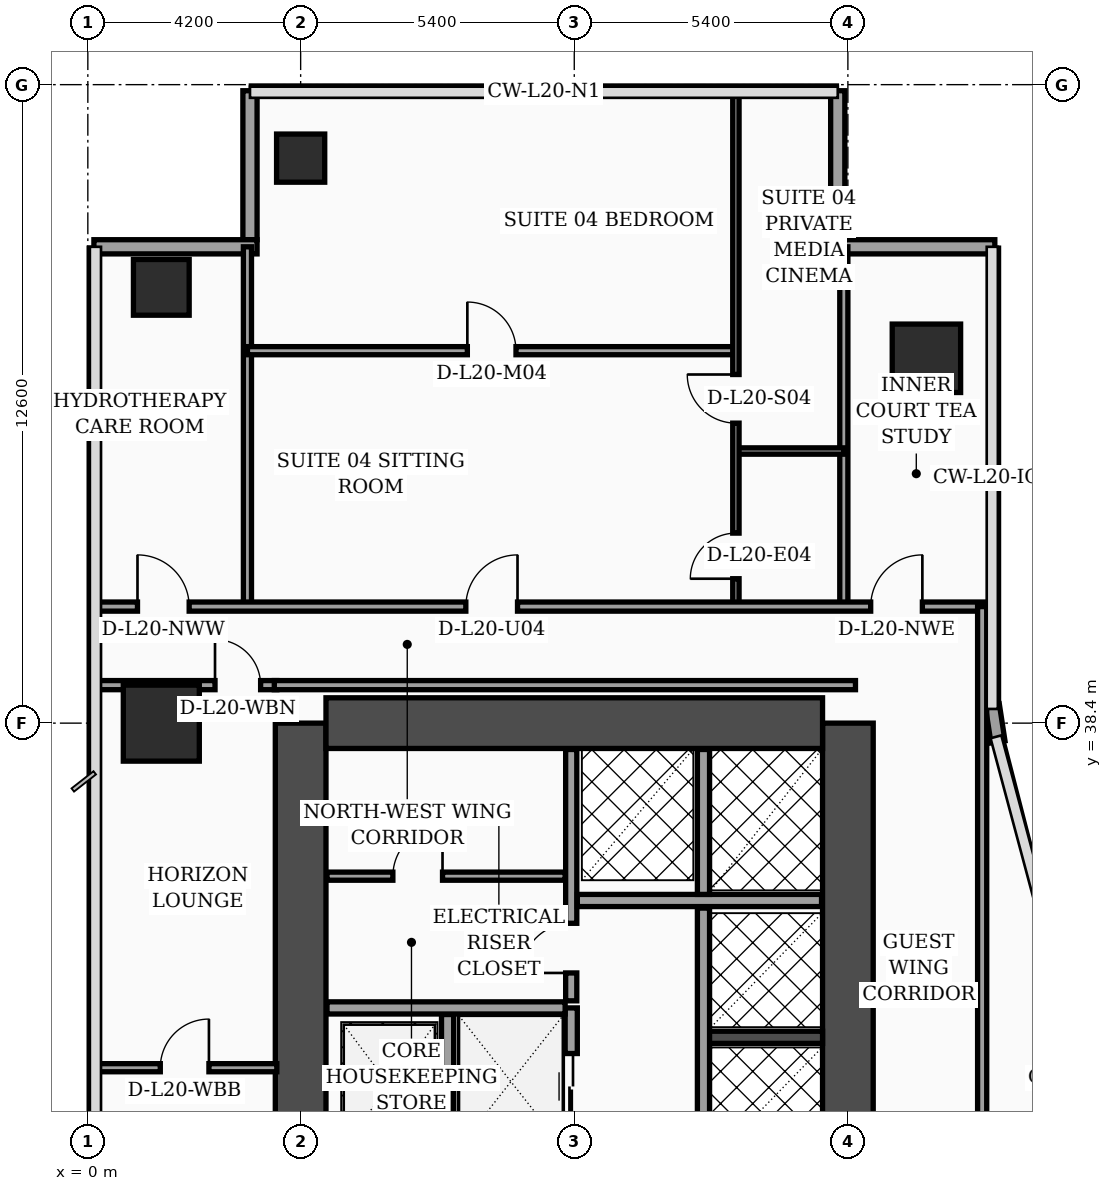
"""IFC4 building model, lengths in metres.
Left out: names, types, materials, properties, quantities, classifications, styles, units other than length and angle.
Written with IfcOpenShell. Run it as: python <this file> out.ifc"""

import sys

from ifc_helpers import new_model, si_unit, direction, frame, frame_2d, origin, origin_2d, place, context, subcontext, project, spatial, rectangle, hollow_rectangle, extrude, element, fill, save


model = new_model("IFC4")
c1 = context("Model", 3, precision=1e-05, world=origin(), true_north=direction((0.0, 1.0)))
c2 = subcontext(c1, "Body", "Model", "MODEL_VIEW")
j1 = project(units=[si_unit("LENGTHUNIT", "METRE"), si_unit("PLANEANGLEUNIT", "RADIAN")], contexts=[c1])
p1 = place(None, origin())
s1 = spatial("IfcSite", under=j1, at=p1, CompositionType="ELEMENT")
p2 = place(p1, origin())
s2 = spatial("IfcBuilding", under=s1, at=p2, CompositionType="ELEMENT")
p3 = place(p2, frame((0.0, 0.0, 85.0)))
s3 = spatial("IfcBuildingStorey", under=s2, at=p3, CompositionType="ELEMENT", Elevation=85.0)
p4 = place(p3, frame((4.2, 16.8, 0.0), z_axis=(0.0, 0.0, 1.0), x_axis=(0.0, 1.0, 0.0)))
e1 = element("IfcWall", 1, at=p4, inside=s3, PredefinedType="SHEAR", context=c2, shape_type="SweptSolid", body=[
    extrude(rectangle(XDim=21.6, YDim=1.0, at=frame_2d((10.8, 0.0))), origin(), (0.0, 0.0, 1.0), 3.56),
])
p5 = place(p3, frame((15.0, 16.8, 0.0), z_axis=(0.0, 0.0, 1.0), x_axis=(0.0, 1.0, 0.0)))
e2 = element("IfcWall", 2, at=p5, inside=s3, PredefinedType="SHEAR", context=c2, shape_type="SweptSolid", body=[
    extrude(rectangle(XDim=21.6, YDim=1.0, at=frame_2d((10.8, 0.0))), origin(), (0.0, 0.0, 1.0), 3.56),
])
p6 = place(p5, frame((8.65, 0.0, 0.0)))
e3 = element("IfcOpeningElement", 3, at=p6, cuts=e2, PredefinedType="OPENING", context=c2, shape_type="SweptSolid", body=[
    extrude(rectangle(XDim=1.1, YDim=2.2, at=frame_2d((0.55, 1.1))), frame((0.0, 0.51, 0.0), z_axis=(0.0, -1.0, 0.0), x_axis=(1.0, 0.0, 0.0)), (0.0, 0.0, 1.0), 1.02),
])
p7 = place(p5, frame((1.25, 0.0, 0.0)))
e4 = element("IfcOpeningElement", 4, at=p7, cuts=e2, PredefinedType="OPENING", context=c2, shape_type="SweptSolid", body=[
    extrude(rectangle(XDim=1.1, YDim=2.2, at=frame_2d((0.55, 1.1))), frame((0.0, 0.51, 0.0), z_axis=(0.0, -1.0, 0.0), x_axis=(1.0, 0.0, 0.0)), (0.0, 0.0, 1.0), 1.02),
])
p8 = place(p5, frame((3.8, 0.0, 0.0)))
e5 = element("IfcOpeningElement", 5, at=p8, cuts=e2, PredefinedType="OPENING", context=c2, shape_type="SweptSolid", body=[
    extrude(rectangle(XDim=1.1, YDim=2.2, at=frame_2d((0.55, 1.1))), frame((0.0, 0.51, 0.0), z_axis=(0.0, -1.0, 0.0), x_axis=(1.0, 0.0, 0.0)), (0.0, 0.0, 1.0), 1.02),
])
p9 = place(p5, frame((6.35, 0.0, 0.0)))
e6 = element("IfcOpeningElement", 6, at=p9, cuts=e2, PredefinedType="OPENING", context=c2, shape_type="SweptSolid", body=[
    extrude(rectangle(XDim=1.1, YDim=2.2, at=frame_2d((0.55, 1.1))), frame((0.0, 0.51, 0.0), z_axis=(0.0, -1.0, 0.0), x_axis=(1.0, 0.0, 0.0)), (0.0, 0.0, 1.0), 1.02),
])
p10 = place(p3, frame((4.7, 38.4, 0.0), z_axis=(0.0, 0.0, 1.0), x_axis=(1.0, 0.0, 0.0)))
e7 = element("IfcWall", 7, at=p10, inside=s3, PredefinedType="SHEAR", context=c2, shape_type="SweptSolid", body=[
    extrude(rectangle(XDim=9.8, YDim=1.0, at=frame_2d((4.9, 0.0))), origin(), (0.0, 0.0, 1.0), 3.56),
])
p11 = place(p3, frame((12.18, 32.2, 0.0), z_axis=(0.0, 0.0, 1.0), x_axis=(1.0, 0.0, 0.0)))
e8 = element("IfcWall", 8, at=p11, inside=s3, PredefinedType="SOLIDWALL", context=c2, shape_type="SweptSolid", body=[
    extrude(rectangle(XDim=2.32, YDim=0.24, at=frame_2d((1.16, 0.0))), origin(), (0.0, 0.0, 1.0), 3.56),
])
p12 = place(p3, frame((1.45, 38.4, 0.0), z_axis=(0.0, 0.0, 1.0), x_axis=(1.0, 0.0, 0.0)))
e9 = element("IfcColumn", 9, at=p12, inside=s3, PredefinedType="COLUMN", context=c2, shape_type="SweptSolid", body=[
    extrude(rectangle(XDim=1.5, YDim=1.5, at=origin_2d()), origin(), (0.0, 0.0, 1.0), 3.56),
])
p13 = place(p3, frame((1.45, 47.0, 0.0), z_axis=(0.0, 0.0, 1.0), x_axis=(1.0, 0.0, 0.0)))
e10 = element("IfcColumn", 10, at=p13, inside=s3, PredefinedType="COLUMN", context=c2, shape_type="SweptSolid", body=[
    extrude(hollow_rectangle(XDim=1.1, YDim=1.1, WallThickness=0.045, at=origin_2d()), origin(), (0.0, 0.0, 1.0), 3.56),
])
p14 = place(p3, frame((4.2, 49.55, 0.0), z_axis=(0.0, 0.0, 1.0), x_axis=(1.0, 0.0, 0.0)))
e11 = element("IfcColumn", 11, at=p14, inside=s3, PredefinedType="COLUMN", context=c2, shape_type="SweptSolid", body=[
    extrude(hollow_rectangle(XDim=0.95, YDim=0.95, WallThickness=0.04, at=origin_2d()), origin(), (0.0, 0.0, 1.0), 3.56),
])
p15 = place(p3, frame((16.55, 45.6, 0.0), z_axis=(0.0, 0.0, 1.0), x_axis=(1.0, 0.0, 0.0)))
e12 = element("IfcColumn", 12, at=p15, inside=s3, PredefinedType="COLUMN", context=c2, shape_type="SweptSolid", body=[
    extrude(rectangle(XDim=1.35, YDim=1.35, at=origin_2d()), origin(), (0.0, 0.0, 1.0), 3.56),
])
p16 = place(p3, frame((17.962, 38.03, 0.0), z_axis=(0.0, 0.0, 1.0), x_axis=(-0.15141125477, 0.988470855377, 0.0)))
e13 = element("IfcWall", 13, at=p16, inside=s3, PredefinedType="SOLIDWALL", context=c2, shape_type="SweptSolid", body=[
    extrude(rectangle(XDim=0.739, YDim=0.28, at=frame_2d((0.369, 0.0))), origin(), (0.0, 0.0, 1.0), 3.56),
])
p17 = place(p3, frame((17.9, 47.8, 0.0), z_axis=(0.0, 0.0, 1.0), x_axis=(-1.0, 0.0, 0.0)))
e14 = element("IfcWall", 14, at=p17, inside=s3, PredefinedType="SOLIDWALL", context=c2, shape_type="SweptSolid", body=[
    extrude(rectangle(XDim=3.24, YDim=0.28, at=frame_2d((1.62, 0.0))), origin(), (0.0, 0.0, 1.0), 3.56),
])
p18 = place(p3, frame((14.8, 47.94, 0.0), z_axis=(0.0, 0.0, 1.0), x_axis=(0.0, 1.0, 0.0)))
e15 = element("IfcWall", 15, at=p18, inside=s3, PredefinedType="SOLIDWALL", context=c2, shape_type="SweptSolid", body=[
    extrude(rectangle(XDim=2.94, YDim=0.28, at=frame_2d((1.47, 0.0))), origin(), (0.0, 0.0, 1.0), 3.56),
])
p19 = place(p3, frame((3.2, 50.88, 0.0), z_axis=(0.0, 0.0, 1.0), x_axis=(0.0, -1.0, 0.0)))
e16 = element("IfcWall", 16, at=p19, inside=s3, PredefinedType="SOLIDWALL", context=c2, shape_type="SweptSolid", body=[
    extrude(rectangle(XDim=2.94, YDim=0.28, at=frame_2d((1.47, 0.0))), origin(), (0.0, 0.0, 1.0), 3.04),
])
p20 = place(p3, frame((3.34, 47.8, 0.0), z_axis=(0.0, 0.0, 1.0), x_axis=(-1.0, 0.0, 0.0)))
e17 = element("IfcWall", 17, at=p20, inside=s3, PredefinedType="SOLIDWALL", context=c2, shape_type="SweptSolid", body=[
    extrude(rectangle(XDim=3.22, YDim=0.28, at=frame_2d((1.61, 0.0))), origin(), (0.0, 0.0, 1.0), 3.04),
])
p21 = place(p3, frame((7.1, 30.02, 0.0), z_axis=(0.0, 0.0, 1.0), x_axis=(0.0, 1.0, 0.0)))
e18 = element("IfcWall", 18, at=p21, inside=s3, PredefinedType="SOLIDWALL", context=c2, shape_type="SweptSolid", body=[
    extrude(rectangle(XDim=2.63, YDim=0.24, at=frame_2d((1.315, 0.0))), origin(), (0.0, 0.0, 1.0), 3.56),
])
p22 = place(p3, frame((9.54, 29.88, 0.0), z_axis=(0.0, 0.0, 1.0), x_axis=(0.0, 1.0, 0.0)))
e19 = element("IfcWall", 19, at=p22, inside=s3, PredefinedType="SOLIDWALL", context=c2, shape_type="SweptSolid", body=[
    extrude(rectangle(XDim=2.9, YDim=0.24, at=frame_2d((1.45, 0.0))), origin(), (0.0, 0.0, 1.0), 3.56),
])
p23 = place(p22, frame((0.7, 0.0, 0.0)))
e20 = element("IfcOpeningElement", 20, at=p23, cuts=e19, PredefinedType="OPENING", context=c2, shape_type="SweptSolid", body=[
    extrude(rectangle(XDim=1.3, YDim=2.35, at=frame_2d((0.65, 1.175))), frame((0.0, 0.13, 0.0), z_axis=(0.0, -1.0, 0.0), x_axis=(1.0, 0.0, 0.0)), (0.0, 0.0, 1.0), 0.26),
])
p24 = place(p3, frame((4.72, 32.78, 0.0), z_axis=(0.0, 0.0, 1.0), x_axis=(1.0, 0.0, 0.0)))
e21 = element("IfcWall", 21, at=p24, inside=s3, PredefinedType="SOLIDWALL", context=c2, shape_type="SweptSolid", body=[
    extrude(rectangle(XDim=4.7, YDim=0.24, at=frame_2d((2.35, 0.0))), origin(), (0.0, 0.0, 1.0), 3.56),
])
p25 = place(p3, frame((4.72, 35.38, 0.0), z_axis=(0.0, 0.0, 1.0), x_axis=(1.0, 0.0, 0.0)))
e22 = element("IfcWall", 22, at=p25, inside=s3, PredefinedType="PARTITIONING", context=c2, shape_type="SweptSolid", body=[
    extrude(rectangle(XDim=4.7, YDim=0.16, at=frame_2d((2.35, 0.0))), origin(), (0.0, 0.0, 1.0), 3.56),
])
p26 = place(p25, frame((1.3, 0.0, 0.0)))
e23 = element("IfcOpeningElement", 23, at=p26, cuts=e22, PredefinedType="OPENING", context=c2, shape_type="SweptSolid", body=[
    extrude(rectangle(XDim=0.98, YDim=2.15, at=frame_2d((0.49, 1.075))), frame((0.0, 0.09, 0.0), z_axis=(0.0, -1.0, 0.0), x_axis=(1.0, 0.0, 0.0)), (0.0, 0.0, 1.0), 0.18),
])
p27 = place(p3, frame((9.54, 32.92, 0.0), z_axis=(0.0, 0.0, 1.0), x_axis=(0.0, 1.0, 0.0)))
e24 = element("IfcWall", 24, at=p27, inside=s3, PredefinedType="SOLIDWALL", context=c2, shape_type="SweptSolid", body=[
    extrude(rectangle(XDim=4.96, YDim=0.22, at=frame_2d((2.48, 0.0))), origin(), (0.0, 0.0, 1.0), 3.56),
])
p28 = place(p27, frame((0.55, 0.0, 0.0)))
e25 = element("IfcOpeningElement", 25, at=p28, cuts=e24, PredefinedType="OPENING", context=c2, shape_type="SweptSolid", body=[
    extrude(rectangle(XDim=0.98, YDim=2.15, at=frame_2d((0.49, 1.075))), frame((0.0, 0.12, 0.0), z_axis=(0.0, -1.0, 0.0), x_axis=(1.0, 0.0, 0.0)), (0.0, 0.0, 1.0), 0.24),
])
p29 = place(p3, frame((12.15, 27.0, 0.0), z_axis=(0.0, 0.0, 1.0), x_axis=(0.0, 1.0, 0.0)))
e26 = element("IfcWall", 26, at=p29, inside=s3, PredefinedType="SOLIDWALL", context=c2, shape_type="SweptSolid", body=[
    extrude(rectangle(XDim=7.75, YDim=0.24, at=frame_2d((3.875, 0.0))), origin(), (0.0, 0.0, 1.0), 3.56),
])
p30 = place(p3, frame((9.66, 34.9, 0.0), z_axis=(0.0, 0.0, 1.0), x_axis=(1.0, 0.0, 0.0)))
e27 = element("IfcWall", 27, at=p30, inside=s3, PredefinedType="SOLIDWALL", context=c2, shape_type="SweptSolid", body=[
    extrude(rectangle(XDim=4.82, YDim=0.24, at=frame_2d((2.41, 0.0))), origin(), (0.0, 0.0, 1.0), 3.56),
])
p31 = place(p3, frame((12.15, 35.02, 0.0), z_axis=(0.0, 0.0, 1.0), x_axis=(0.0, 1.0, 0.0)))
e28 = element("IfcWall", 28, at=p31, inside=s3, PredefinedType="SOLIDWALL", context=c2, shape_type="SweptSolid", body=[
    extrude(rectangle(XDim=2.86, YDim=0.24, at=frame_2d((1.43, 0.0))), origin(), (0.0, 0.0, 1.0), 3.56),
])
p32 = place(p3, frame((0.08, 31.6, 0.0), z_axis=(0.0, 0.0, 1.0), x_axis=(1.0, 0.0, 0.0)))
e29 = element("IfcWall", 29, at=p32, inside=s3, PredefinedType="PARTITIONING", context=c2, shape_type="SweptSolid", body=[
    extrude(rectangle(XDim=3.65, YDim=0.16, at=frame_2d((1.825, 0.0))), origin(), (0.0, 0.0, 1.0), 3.04),
])
p33 = place(p32, frame((1.35, 0.0, 0.0)))
e30 = element("IfcOpeningElement", 30, at=p33, cuts=e29, PredefinedType="OPENING", context=c2, shape_type="SweptSolid", body=[
    extrude(rectangle(XDim=0.96, YDim=2.2, at=frame_2d((0.48, 1.1))), frame((0.0, 0.09, 0.0), z_axis=(0.0, -1.0, 0.0), x_axis=(1.0, 0.0, 0.0)), (0.0, 0.0, 1.0), 0.18),
])
p34 = place(p3, frame((0.08, 39.15, 0.0), z_axis=(0.0, 0.0, 1.0), x_axis=(1.0, 0.0, 0.0)))
e31 = element("IfcWall", 31, at=p34, inside=s3, PredefinedType="PARTITIONING", context=c2, shape_type="SweptSolid", body=[
    extrude(rectangle(XDim=3.65, YDim=0.18, at=frame_2d((1.825, 0.0))), origin(), (0.0, 0.0, 1.0), 2.84),
])
p35 = place(p34, frame((2.43, 0.0, 0.0)))
e32 = element("IfcOpeningElement", 32, at=p35, cuts=e31, PredefinedType="OPENING", context=c2, shape_type="SweptSolid", body=[
    extrude(rectangle(XDim=0.9, YDim=2.15, at=frame_2d((0.45, 1.075))), frame((0.0, 0.1, 0.0), z_axis=(0.0, -1.0, 0.0), x_axis=(1.0, 0.0, 0.0)), (0.0, 0.0, 1.0), 0.2),
])
p36 = place(p3, frame((3.15, 40.7, 0.0), z_axis=(0.0, 0.0, 1.0), x_axis=(0.0, 1.0, 0.0)))
e33 = element("IfcWall", 33, at=p36, inside=s3, PredefinedType="PARTITIONING", context=c2, shape_type="SweptSolid", body=[
    extrude(rectangle(XDim=7.1, YDim=0.16, at=frame_2d((3.55, 0.0))), origin(), (0.0, 0.0, 1.0), 3.14),
])
p37 = place(p3, frame((14.92, 40.7, 0.0), z_axis=(0.0, 0.0, 1.0), x_axis=(0.0, 1.0, 0.0)))
e34 = element("IfcWall", 34, at=p37, inside=s3, PredefinedType="PARTITIONING", context=c2, shape_type="SweptSolid", body=[
    extrude(rectangle(XDim=7.1, YDim=0.16, at=frame_2d((3.55, 0.0))), origin(), (0.0, 0.0, 1.0), 3.04),
])
p38 = place(p3, frame((12.79, 43.77, 0.0), z_axis=(0.0, 0.0, 1.0), x_axis=(1.0, 0.0, 0.0)))
e35 = element("IfcWall", 35, at=p38, inside=s3, PredefinedType="PARTITIONING", context=c2, shape_type="SweptSolid", body=[
    extrude(rectangle(XDim=2.13, YDim=0.125, at=frame_2d((1.065, 0.0))), origin(), (0.0, 0.0, 1.0), 3.56),
])
p39 = place(p3, frame((3.15, 45.75, 0.0), z_axis=(0.0, 0.0, 1.0), x_axis=(1.0, 0.0, 0.0)))
e36 = element("IfcWall", 36, at=p39, inside=s3, PredefinedType="PARTITIONING", context=c2, shape_type="SweptSolid", body=[
    extrude(rectangle(XDim=9.64, YDim=0.16, at=frame_2d((4.82, 0.0))), origin(), (0.0, 0.0, 1.0), 2.84),
])
p40 = place(p39, frame((4.34, 0.0, 0.0)))
e37 = element("IfcOpeningElement", 37, at=p40, cuts=e36, PredefinedType="OPENING", context=c2, shape_type="SweptSolid", body=[
    extrude(rectangle(XDim=0.96, YDim=2.2, at=frame_2d((0.48, 1.1))), frame((0.0, 0.09, 0.0), z_axis=(0.0, -1.0, 0.0), x_axis=(1.0, 0.0, 0.0)), (0.0, 0.0, 1.0), 0.18),
])
p41 = place(p3, frame((12.79, 40.7, 0.0), z_axis=(0.0, 0.0, 1.0), x_axis=(0.0, 1.0, 0.0)))
e38 = element("IfcWall", 38, at=p41, inside=s3, PredefinedType="PARTITIONING", context=c2, shape_type="SweptSolid", body=[
    extrude(rectangle(XDim=10.24, YDim=0.125, at=frame_2d((5.12, 0.0))), origin(), (0.0, 0.0, 1.0), 3.04),
])
p42 = place(p41, frame((0.55, 0.0, 0.0)))
e39 = element("IfcOpeningElement", 39, at=p42, cuts=e38, PredefinedType="OPENING", context=c2, shape_type="SweptSolid", body=[
    extrude(rectangle(XDim=0.9, YDim=2.15, at=frame_2d((0.45, 1.075))), frame((0.0, 0.073, 0.0), z_axis=(0.0, -1.0, 0.0), x_axis=(1.0, 0.0, 0.0)), (0.0, 0.0, 1.0), 0.145),
])
p43 = place(p41, frame((3.62, 0.0, 0.0)))
e40 = element("IfcOpeningElement", 40, at=p43, cuts=e38, PredefinedType="OPENING", context=c2, shape_type="SweptSolid", body=[
    extrude(rectangle(XDim=0.96, YDim=2.2, at=frame_2d((0.48, 1.1))), frame((0.0, 0.073, 0.0), z_axis=(0.0, -1.0, 0.0), x_axis=(1.0, 0.0, 0.0)), (0.0, 0.0, 1.0), 0.145),
])
p44 = place(p3, frame((0.08, 40.7, 0.0), z_axis=(0.0, 0.0, 1.0), x_axis=(1.0, 0.0, 0.0)))
e41 = element("IfcWall", 41, at=p44, inside=s3, PredefinedType="PARTITIONING", context=c2, shape_type="SweptSolid", body=[
    extrude(rectangle(XDim=17.77, YDim=0.18, at=frame_2d((8.885, 0.0))), origin(), (0.0, 0.0, 1.0), 2.84),
])
p45 = place(p44, frame((0.9, 0.0, 0.0)))
e42 = element("IfcOpeningElement", 42, at=p45, cuts=e41, PredefinedType="OPENING", context=c2, shape_type="SweptSolid", body=[
    extrude(rectangle(XDim=1.02, YDim=2.2, at=frame_2d((0.51, 1.1))), frame((0.0, 0.1, 0.0), z_axis=(0.0, -1.0, 0.0), x_axis=(1.0, 0.0, 0.0)), (0.0, 0.0, 1.0), 0.2),
])
p46 = place(p44, frame((7.38, 0.0, 0.0)))
e43 = element("IfcOpeningElement", 43, at=p46, cuts=e41, PredefinedType="OPENING", context=c2, shape_type="SweptSolid", body=[
    extrude(rectangle(XDim=1.02, YDim=2.2, at=frame_2d((0.51, 1.1))), frame((0.0, 0.1, 0.0), z_axis=(0.0, -1.0, 0.0), x_axis=(1.0, 0.0, 0.0)), (0.0, 0.0, 1.0), 0.2),
])
p47 = place(p44, frame((15.37, 0.0, 0.0)))
e44 = element("IfcOpeningElement", 44, at=p47, cuts=e41, PredefinedType="OPENING", context=c2, shape_type="SweptSolid", body=[
    extrude(rectangle(XDim=1.02, YDim=2.2, at=frame_2d((0.51, 1.1))), frame((0.0, 0.1, 0.0), z_axis=(0.0, -1.0, 0.0), x_axis=(1.0, 0.0, 0.0)), (0.0, 0.0, 1.0), 0.2),
])
p48 = place(p3, frame((17.65, 24.3, 0.0), z_axis=(0.0, 0.0, 1.0), x_axis=(0.0, 1.0, 0.0)))
e45 = element("IfcWall", 45, at=p48, inside=s3, PredefinedType="PARTITIONING", context=c2, shape_type="SweptSolid", body=[
    extrude(rectangle(XDim=16.4, YDim=0.18, at=frame_2d((8.2, 0.0))), origin(), (0.0, 0.0, 1.0), 2.84),
])
p49 = place(p3, frame((3.68, 39.15, 0.0), z_axis=(0.0, 0.0, 1.0), x_axis=(1.0, 0.0, 0.0)))
e46 = element("IfcWall", 46, at=p49, inside=s3, PredefinedType="PARTITIONING", context=c2, shape_type="SweptSolid", body=[
    extrude(rectangle(XDim=11.47, YDim=0.18, at=frame_2d((5.735, 0.0))), origin(), (0.0, 0.0, 1.0), 2.84),
])
p50 = place(p23, origin())
e47 = element("IfcDoor", 47, at=p50, inside=s3, OperationType="DOUBLE_DOOR_SLIDING", PredefinedType="DOOR", context=c2, shape_type="SweptSolid", body=[
    extrude(rectangle(XDim=1.3, YDim=2.35, at=frame_2d((0.65, 1.175))), frame((0.0, 0.025, 0.0), z_axis=(0.0, -1.0, 0.0), x_axis=(1.0, 0.0, 0.0)), (0.0, 0.0, 1.0), 0.05),
])
fill(e20, e47)
p51 = place(p26, origin())
e48 = element("IfcDoor", 48, at=p51, inside=s3, OperationType="SINGLE_SWING_RIGHT", PredefinedType="DOOR", context=c2, shape_type="SweptSolid", body=[
    extrude(rectangle(XDim=0.98, YDim=2.15, at=frame_2d((0.49, 1.075))), frame((0.0, 0.025, 0.0), z_axis=(0.0, -1.0, 0.0), x_axis=(1.0, 0.0, 0.0)), (0.0, 0.0, 1.0), 0.05),
])
fill(e23, e48)
p52 = place(p28, origin())
e49 = element("IfcDoor", 49, at=p52, inside=s3, OperationType="SINGLE_SWING_LEFT", PredefinedType="DOOR", context=c2, shape_type="SweptSolid", body=[
    extrude(rectangle(XDim=0.98, YDim=2.15, at=frame_2d((0.49, 1.075))), frame((0.0, 0.025, 0.0), z_axis=(0.0, -1.0, 0.0), x_axis=(1.0, 0.0, 0.0)), (0.0, 0.0, 1.0), 0.05),
])
fill(e25, e49)
p53 = place(p33, origin())
e50 = element("IfcDoor", 50, at=p53, inside=s3, OperationType="SINGLE_SWING_RIGHT", PredefinedType="DOOR", context=c2, shape_type="SweptSolid", body=[
    extrude(rectangle(XDim=0.96, YDim=2.2, at=frame_2d((0.48, 1.1))), frame((0.0, 0.025, 0.0), z_axis=(0.0, -1.0, 0.0), x_axis=(1.0, 0.0, 0.0)), (0.0, 0.0, 1.0), 0.05),
])
fill(e30, e50)
p54 = place(p35, origin())
e51 = element("IfcDoor", 51, at=p54, inside=s3, OperationType="SINGLE_SWING_LEFT", PredefinedType="DOOR", context=c2, shape_type="SweptSolid", body=[
    extrude(rectangle(XDim=0.9, YDim=2.15, at=frame_2d((0.45, 1.075))), frame((0.0, 0.025, 0.0), z_axis=(0.0, -1.0, 0.0), x_axis=(1.0, 0.0, 0.0)), (0.0, 0.0, 1.0), 0.05),
])
fill(e32, e51)
p55 = place(p40, origin())
e52 = element("IfcDoor", 52, at=p55, inside=s3, OperationType="SINGLE_SWING_LEFT", PredefinedType="DOOR", context=c2, shape_type="SweptSolid", body=[
    extrude(rectangle(XDim=0.96, YDim=2.2, at=frame_2d((0.48, 1.1))), frame((0.0, 0.025, 0.0), z_axis=(0.0, -1.0, 0.0), x_axis=(1.0, 0.0, 0.0)), (0.0, 0.0, 1.0), 0.05),
])
fill(e37, e52)
p56 = place(p42, origin())
e53 = element("IfcDoor", 53, at=p56, inside=s3, OperationType="SINGLE_SWING_LEFT", PredefinedType="DOOR", context=c2, shape_type="SweptSolid", body=[
    extrude(rectangle(XDim=0.9, YDim=2.15, at=frame_2d((0.45, 1.075))), frame((0.0, 0.025, 0.0), z_axis=(0.0, -1.0, 0.0), x_axis=(1.0, 0.0, 0.0)), (0.0, 0.0, 1.0), 0.05),
])
fill(e39, e53)
p57 = place(p43, origin())
e54 = element("IfcDoor", 54, at=p57, inside=s3, OperationType="SINGLE_SWING_RIGHT", PredefinedType="DOOR", context=c2, shape_type="SweptSolid", body=[
    extrude(rectangle(XDim=0.96, YDim=2.2, at=frame_2d((0.48, 1.1))), frame((0.0, 0.025, 0.0), z_axis=(0.0, -1.0, 0.0), x_axis=(1.0, 0.0, 0.0)), (0.0, 0.0, 1.0), 0.05),
])
fill(e40, e54)
p58 = place(p45, origin())
e55 = element("IfcDoor", 55, at=p58, inside=s3, OperationType="SINGLE_SWING_LEFT", PredefinedType="DOOR", context=c2, shape_type="SweptSolid", body=[
    extrude(rectangle(XDim=1.02, YDim=2.2, at=frame_2d((0.51, 1.1))), frame((0.0, 0.025, 0.0), z_axis=(0.0, -1.0, 0.0), x_axis=(1.0, 0.0, 0.0)), (0.0, 0.0, 1.0), 0.05),
])
fill(e42, e55)
p59 = place(p46, origin())
e56 = element("IfcDoor", 56, at=p59, inside=s3, OperationType="SINGLE_SWING_RIGHT", PredefinedType="DOOR", context=c2, shape_type="SweptSolid", body=[
    extrude(rectangle(XDim=1.02, YDim=2.2, at=frame_2d((0.51, 1.1))), frame((0.0, 0.025, 0.0), z_axis=(0.0, -1.0, 0.0), x_axis=(1.0, 0.0, 0.0)), (0.0, 0.0, 1.0), 0.05),
])
fill(e43, e56)
p60 = place(p47, origin())
e57 = element("IfcDoor", 57, at=p60, inside=s3, OperationType="SINGLE_SWING_RIGHT", PredefinedType="DOOR", context=c2, shape_type="SweptSolid", body=[
    extrude(rectangle(XDim=1.02, YDim=2.2, at=frame_2d((0.51, 1.1))), frame((0.0, 0.025, 0.0), z_axis=(0.0, -1.0, 0.0), x_axis=(1.0, 0.0, 0.0)), (0.0, 0.0, 1.0), 0.05),
])
fill(e44, e57)
save(model, sys.argv[1])
